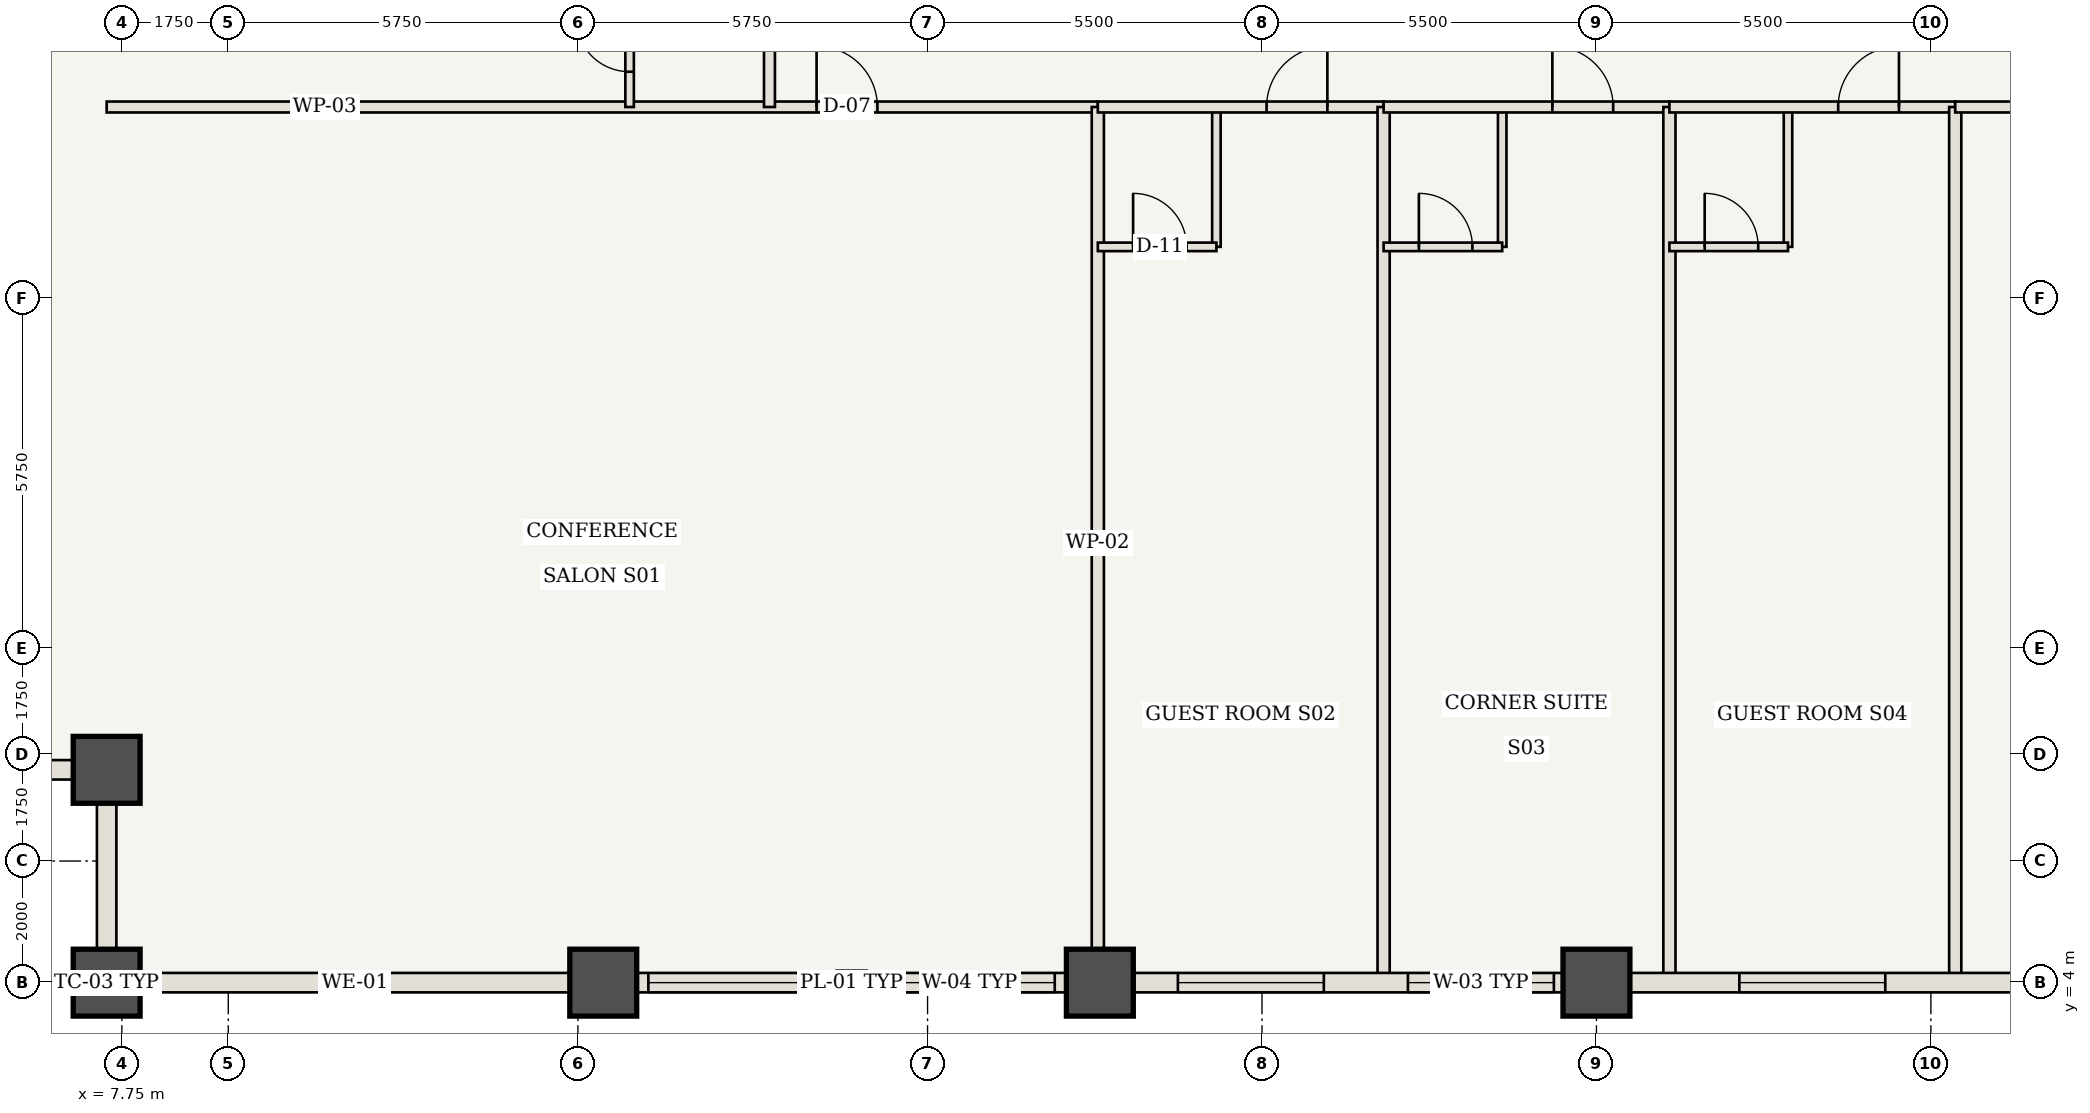
"""IFC4 building model, lengths in metres.
Left out: names, types, materials, properties, quantities, classifications, styles, units other than length and angle.
Written with IfcOpenShell. Run it as: python <this file> out.ifc"""

import sys

from ifc_helpers import new_model, si_unit, direction, frame, frame_2d, origin, origin_2d, place, context, subcontext, project, spatial, rectangle, extrude, element, fill, save


model = new_model("IFC4")
c1 = context("Model", 3, precision=1e-05, world=origin(), true_north=direction((0.0, 1.0)))
c2 = subcontext(c1, "Body", "Model", "MODEL_VIEW")
j1 = project(units=[si_unit("LENGTHUNIT", "METRE"), si_unit("PLANEANGLEUNIT", "RADIAN")], contexts=[c1])
p1 = place(None, origin())
s1 = spatial("IfcSite", under=j1, at=p1, CompositionType="ELEMENT")
p2 = place(p1, origin())
s2 = spatial("IfcBuilding", under=s1, at=p2, CompositionType="ELEMENT")
p3 = place(p2, frame((0.0, 0.0, 38.85)))
s3 = spatial("IfcBuildingStorey", under=s2, at=p3, CompositionType="ELEMENT", Elevation=38.85)
for number, where, z_axis, x_axis in (
    (1, (7.5, 4.0, 0.0), (0.0, 0.0, 1.0), (1.0, 0.0, 0.0)),
    (2, (7.5, 7.5, 0.0), (0.0, 0.0, 1.0), (1.0, 0.0, 0.0)),
    (3, (15.667, 4.0, 0.0), (0.0, 0.0, 1.0), (1.0, 0.0, 0.0)),
    (4, (23.833, 4.0, 0.0), (0.0, 0.0, 1.0), (1.0, 0.0, 0.0)),
    (5, (32.0, 4.0, 0.0), (0.0, 0.0, 1.0), (1.0, 0.0, 0.0)),
):
    element("IfcColumn", number, at=place(p3, frame(where, z_axis=z_axis, x_axis=x_axis)), inside=s3, PredefinedType="COLUMN", context=c2, shape_type="SweptSolid", body=[
        extrude(rectangle(XDim=1.1, YDim=1.1, at=origin_2d()), origin(), (0.0, 0.0, 1.0), 3.5),
    ])
p4 = place(p3, frame((7.5, 18.4, 0.0), z_axis=(0.0, 0.0, 1.0), x_axis=(1.0, 0.0, 0.0)))
e6 = element("IfcWall", 6, at=p4, inside=s3, PredefinedType="STANDARD", context=c2, shape_type="SweptSolid", body=[
    extrude(rectangle(XDim=16.3, YDim=0.18, at=frame_2d((8.15, 0.0))), origin(), (0.0, 0.0, 1.0), 3.08),
])
p5 = place(p4, frame((11.675, 0.0, 0.0)))
e7 = element("IfcOpeningElement", 7, at=p5, cuts=e6, PredefinedType="OPENING", context=c2, shape_type="SweptSolid", body=[
    extrude(rectangle(XDim=1.0, YDim=2.15, at=frame_2d((0.5, 1.075))), frame((0.0, 0.1, 0.0), z_axis=(0.0, -1.0, 0.0), x_axis=(1.0, 0.0, 0.0)), (0.0, 0.0, 1.0), 0.2),
])
p6 = place(p3, frame((23.8, 4.06, 0.0), z_axis=(0.0, 0.0, 1.0), x_axis=(0.0, 1.0, 0.0)))
e8 = element("IfcWall", 8, at=p6, inside=s3, PredefinedType="STANDARD", context=c2, shape_type="SweptSolid", body=[
    extrude(rectangle(XDim=14.34, YDim=0.2, at=frame_2d((7.17, 0.0))), origin(), (0.0, 0.0, 1.0), 3.08),
])
p7 = place(p3, frame((25.75, 16.1, 0.0), z_axis=(0.0, 0.0, 1.0), x_axis=(0.0, 1.0, 0.0)))
e9 = element("IfcWall", 9, at=p7, inside=s3, PredefinedType="STANDARD", context=c2, shape_type="SweptSolid", body=[
    extrude(rectangle(XDim=2.3, YDim=0.14, at=frame_2d((1.15, 0.0))), origin(), (0.0, 0.0, 1.0), 3.08),
])
p8 = place(p3, frame((23.8, 16.1, 0.0), z_axis=(0.0, 0.0, 1.0), x_axis=(1.0, 0.0, 0.0)))
e10 = element("IfcWall", 10, at=p8, inside=s3, PredefinedType="STANDARD", context=c2, shape_type="SweptSolid", body=[
    extrude(rectangle(XDim=1.95, YDim=0.14, at=frame_2d((0.975, 0.0))), origin(), (0.0, 0.0, 1.0), 3.08),
])
p9 = place(p8, frame((0.58, 0.0, 0.0)))
e11 = element("IfcOpeningElement", 11, at=p9, cuts=e10, PredefinedType="OPENING", context=c2, shape_type="SweptSolid", body=[
    extrude(rectangle(XDim=0.88, YDim=2.1, at=frame_2d((0.44, 1.05))), frame((0.0, 0.08, 0.0), z_axis=(0.0, -1.0, 0.0), x_axis=(1.0, 0.0, 0.0)), (0.0, 0.0, 1.0), 0.16),
])
p10 = place(p3, frame((23.8, 18.4, 0.0), z_axis=(0.0, 0.0, 1.0), x_axis=(1.0, 0.0, 0.0)))
e12 = element("IfcWall", 12, at=p10, inside=s3, PredefinedType="STANDARD", context=c2, shape_type="SweptSolid", body=[
    extrude(rectangle(XDim=4.7, YDim=0.18, at=frame_2d((2.35, 0.0))), origin(), (0.0, 0.0, 1.0), 3.08),
])
p11 = place(p10, frame((2.775, 0.0, 0.0)))
e13 = element("IfcOpeningElement", 13, at=p11, cuts=e12, PredefinedType="OPENING", context=c2, shape_type="SweptSolid", body=[
    extrude(rectangle(XDim=1.0, YDim=2.15, at=frame_2d((0.5, 1.075))), frame((0.0, 0.1, 0.0), z_axis=(0.0, -1.0, 0.0), x_axis=(1.0, 0.0, 0.0)), (0.0, 0.0, 1.0), 0.2),
])
p12 = place(p3, frame((28.5, 4.06, 0.0), z_axis=(0.0, 0.0, 1.0), x_axis=(0.0, 1.0, 0.0)))
e14 = element("IfcWall", 14, at=p12, inside=s3, PredefinedType="STANDARD", context=c2, shape_type="SweptSolid", body=[
    extrude(rectangle(XDim=14.34, YDim=0.2, at=frame_2d((7.17, 0.0))), origin(), (0.0, 0.0, 1.0), 3.08),
])
p13 = place(p3, frame((30.45, 16.1, 0.0), z_axis=(0.0, 0.0, 1.0), x_axis=(0.0, 1.0, 0.0)))
e15 = element("IfcWall", 15, at=p13, inside=s3, PredefinedType="STANDARD", context=c2, shape_type="SweptSolid", body=[
    extrude(rectangle(XDim=2.3, YDim=0.14, at=frame_2d((1.15, 0.0))), origin(), (0.0, 0.0, 1.0), 3.08),
])
p14 = place(p3, frame((28.5, 16.1, 0.0), z_axis=(0.0, 0.0, 1.0), x_axis=(1.0, 0.0, 0.0)))
e16 = element("IfcWall", 16, at=p14, inside=s3, PredefinedType="STANDARD", context=c2, shape_type="SweptSolid", body=[
    extrude(rectangle(XDim=1.95, YDim=0.14, at=frame_2d((0.975, 0.0))), origin(), (0.0, 0.0, 1.0), 3.08),
])
p15 = place(p14, frame((0.58, 0.0, 0.0)))
e17 = element("IfcOpeningElement", 17, at=p15, cuts=e16, PredefinedType="OPENING", context=c2, shape_type="SweptSolid", body=[
    extrude(rectangle(XDim=0.88, YDim=2.1, at=frame_2d((0.44, 1.05))), frame((0.0, 0.08, 0.0), z_axis=(0.0, -1.0, 0.0), x_axis=(1.0, 0.0, 0.0)), (0.0, 0.0, 1.0), 0.16),
])
p16 = place(p3, frame((28.5, 18.4, 0.0), z_axis=(0.0, 0.0, 1.0), x_axis=(1.0, 0.0, 0.0)))
e18 = element("IfcWall", 18, at=p16, inside=s3, PredefinedType="STANDARD", context=c2, shape_type="SweptSolid", body=[
    extrude(rectangle(XDim=4.7, YDim=0.18, at=frame_2d((2.35, 0.0))), origin(), (0.0, 0.0, 1.0), 3.08),
])
p17 = place(p16, frame((2.775, 0.0, 0.0)))
e19 = element("IfcOpeningElement", 19, at=p17, cuts=e18, PredefinedType="OPENING", context=c2, shape_type="SweptSolid", body=[
    extrude(rectangle(XDim=1.0, YDim=2.15, at=frame_2d((0.5, 1.075))), frame((0.0, 0.1, 0.0), z_axis=(0.0, -1.0, 0.0), x_axis=(1.0, 0.0, 0.0)), (0.0, 0.0, 1.0), 0.2),
])
p18 = place(p3, frame((33.2, 4.06, 0.0), z_axis=(0.0, 0.0, 1.0), x_axis=(0.0, 1.0, 0.0)))
e20 = element("IfcWall", 20, at=p18, inside=s3, PredefinedType="STANDARD", context=c2, shape_type="SweptSolid", body=[
    extrude(rectangle(XDim=14.34, YDim=0.2, at=frame_2d((7.17, 0.0))), origin(), (0.0, 0.0, 1.0), 3.08),
])
p19 = place(p3, frame((35.15, 16.1, 0.0), z_axis=(0.0, 0.0, 1.0), x_axis=(0.0, 1.0, 0.0)))
e21 = element("IfcWall", 21, at=p19, inside=s3, PredefinedType="STANDARD", context=c2, shape_type="SweptSolid", body=[
    extrude(rectangle(XDim=2.3, YDim=0.14, at=frame_2d((1.15, 0.0))), origin(), (0.0, 0.0, 1.0), 3.08),
])
p20 = place(p3, frame((33.2, 16.1, 0.0), z_axis=(0.0, 0.0, 1.0), x_axis=(1.0, 0.0, 0.0)))
e22 = element("IfcWall", 22, at=p20, inside=s3, PredefinedType="STANDARD", context=c2, shape_type="SweptSolid", body=[
    extrude(rectangle(XDim=1.95, YDim=0.14, at=frame_2d((0.975, 0.0))), origin(), (0.0, 0.0, 1.0), 3.08),
])
p21 = place(p20, frame((0.58, 0.0, 0.0)))
e23 = element("IfcOpeningElement", 23, at=p21, cuts=e22, PredefinedType="OPENING", context=c2, shape_type="SweptSolid", body=[
    extrude(rectangle(XDim=0.88, YDim=2.1, at=frame_2d((0.44, 1.05))), frame((0.0, 0.08, 0.0), z_axis=(0.0, -1.0, 0.0), x_axis=(1.0, 0.0, 0.0)), (0.0, 0.0, 1.0), 0.16),
])
p22 = place(p3, frame((33.2, 18.4, 0.0), z_axis=(0.0, 0.0, 1.0), x_axis=(1.0, 0.0, 0.0)))
e24 = element("IfcWall", 24, at=p22, inside=s3, PredefinedType="STANDARD", context=c2, shape_type="SweptSolid", body=[
    extrude(rectangle(XDim=4.7, YDim=0.18, at=frame_2d((2.35, 0.0))), origin(), (0.0, 0.0, 1.0), 3.08),
])
p23 = place(p22, frame((2.775, 0.0, 0.0)))
e25 = element("IfcOpeningElement", 25, at=p23, cuts=e24, PredefinedType="OPENING", context=c2, shape_type="SweptSolid", body=[
    extrude(rectangle(XDim=1.0, YDim=2.15, at=frame_2d((0.5, 1.075))), frame((0.0, 0.1, 0.0), z_axis=(0.0, -1.0, 0.0), x_axis=(1.0, 0.0, 0.0)), (0.0, 0.0, 1.0), 0.2),
])
p24 = place(p3, frame((37.9, 4.06, 0.0), z_axis=(0.0, 0.0, 1.0), x_axis=(0.0, 1.0, 0.0)))
e26 = element("IfcWall", 26, at=p24, inside=s3, PredefinedType="STANDARD", context=c2, shape_type="SweptSolid", body=[
    extrude(rectangle(XDim=14.34, YDim=0.2, at=frame_2d((7.17, 0.0))), origin(), (0.0, 0.0, 1.0), 3.08),
])
p25 = place(p3, frame((37.9, 18.4, 0.0), z_axis=(0.0, 0.0, 1.0), x_axis=(1.0, 0.0, 0.0)))
e27 = element("IfcWall", 27, at=p25, inside=s3, PredefinedType="STANDARD", context=c2, shape_type="SweptSolid", body=[
    extrude(rectangle(XDim=18.6, YDim=0.18, at=frame_2d((9.3, 0.0))), origin(), (0.0, 0.0, 1.0), 3.08),
])
p26 = place(p25, frame((4.775, 0.0, 0.0)))
e28 = element("IfcOpeningElement", 28, at=p26, cuts=e27, PredefinedType="OPENING", context=c2, shape_type="SweptSolid", body=[
    extrude(rectangle(XDim=1.0, YDim=2.15, at=frame_2d((0.5, 1.075))), frame((0.0, 0.1, 0.0), z_axis=(0.0, -1.0, 0.0), x_axis=(1.0, 0.0, 0.0)), (0.0, 0.0, 1.0), 0.2),
])
p27 = place(p3, frame((16.1, 18.4, 0.0), z_axis=(0.0, 0.0, 1.0), x_axis=(0.0, 1.0, 0.0)))
e29 = element("IfcWall", 29, at=p27, inside=s3, PredefinedType="STANDARD", context=c2, shape_type="SweptSolid", body=[
    extrude(rectangle(XDim=1.95, YDim=0.14, at=frame_2d((0.975, 0.0))), origin(), (0.0, 0.0, 1.0), 3.08),
])
p28 = place(p27, frame((0.58, 0.0, 0.0)))
e30 = element("IfcOpeningElement", 30, at=p28, cuts=e29, PredefinedType="OPENING", context=c2, shape_type="SweptSolid", body=[
    extrude(rectangle(XDim=0.88, YDim=2.1, at=frame_2d((0.44, 1.05))), frame((0.0, 0.08, 0.0), z_axis=(0.0, -1.0, 0.0), x_axis=(1.0, 0.0, 0.0)), (0.0, 0.0, 1.0), 0.16),
])
p29 = place(p3, frame((18.4, 18.4, 0.0), z_axis=(0.0, 0.0, 1.0), x_axis=(0.0, 1.0, 0.0)))
e31 = element("IfcWall", 31, at=p29, inside=s3, PredefinedType="STANDARD", context=c2, shape_type="SweptSolid", body=[
    extrude(rectangle(XDim=4.8, YDim=0.18, at=frame_2d((2.4, 0.0))), origin(), (0.0, 0.0, 1.0), 3.08),
])
p30 = place(p29, frame((2.825, 0.0, 0.0)))
e32 = element("IfcOpeningElement", 32, at=p30, cuts=e31, PredefinedType="OPENING", context=c2, shape_type="SweptSolid", body=[
    extrude(rectangle(XDim=1.0, YDim=2.15, at=frame_2d((0.5, 1.075))), frame((0.0, 0.1, 0.0), z_axis=(0.0, -1.0, 0.0), x_axis=(1.0, 0.0, 0.0)), (0.0, 0.0, 1.0), 0.2),
])
p31 = place(p3, frame((15.667, 4.0, 0.0), z_axis=(0.0, 0.0, 1.0), x_axis=(-1.0, 0.0, 0.0)))
e33 = element("IfcWall", 33, at=p31, inside=s3, PredefinedType="USERDEFINED", context=c2, shape_type="SweptSolid", body=[
    extrude(rectangle(XDim=8.167, YDim=0.32, at=frame_2d((4.083, 0.0))), origin(), (0.0, 0.0, 1.0), 2.28),
])
p32 = place(p3, frame((23.833, 4.0, 0.0), z_axis=(0.0, 0.0, 1.0), x_axis=(-1.0, 0.0, 0.0)))
e34 = element("IfcWall", 34, at=p32, inside=s3, PredefinedType="USERDEFINED", context=c2, shape_type="SweptSolid", body=[
    extrude(rectangle(XDim=8.167, YDim=0.32, at=frame_2d((4.083, 0.0))), origin(), (0.0, 0.0, 1.0), 2.28),
])
p33 = place(p32, frame((0.742, 0.0, 0.85)))
e35 = element("IfcOpeningElement", 35, at=p33, cuts=e34, PredefinedType="OPENING", context=c2, shape_type="SweptSolid", body=[
    extrude(rectangle(XDim=2.8, YDim=1.23, at=frame_2d((1.4, 0.615))), frame((0.0, 0.17, 0.0), z_axis=(0.0, -1.0, 0.0), x_axis=(1.0, 0.0, 0.0)), (0.0, 0.0, 1.0), 0.34),
])
p34 = place(p32, frame((4.625, 0.0, 0.85)))
e36 = element("IfcOpeningElement", 36, at=p34, cuts=e34, PredefinedType="OPENING", context=c2, shape_type="SweptSolid", body=[
    extrude(rectangle(XDim=2.8, YDim=1.23, at=frame_2d((1.4, 0.615))), frame((0.0, 0.17, 0.0), z_axis=(0.0, -1.0, 0.0), x_axis=(1.0, 0.0, 0.0)), (0.0, 0.0, 1.0), 0.34),
])
p35 = place(p3, frame((32.0, 4.0, 0.0), z_axis=(0.0, 0.0, 1.0), x_axis=(-1.0, 0.0, 0.0)))
e37 = element("IfcWall", 37, at=p35, inside=s3, PredefinedType="USERDEFINED", context=c2, shape_type="SweptSolid", body=[
    extrude(rectangle(XDim=8.167, YDim=0.32, at=frame_2d((4.083, 0.0))), origin(), (0.0, 0.0, 1.0), 2.28),
])
p36 = place(p35, frame((0.7, 0.0, 0.85)))
e38 = element("IfcOpeningElement", 38, at=p36, cuts=e37, PredefinedType="OPENING", context=c2, shape_type="SweptSolid", body=[
    extrude(rectangle(XDim=2.4, YDim=1.23, at=frame_2d((1.2, 0.615))), frame((0.0, 0.17, 0.0), z_axis=(0.0, -1.0, 0.0), x_axis=(1.0, 0.0, 0.0)), (0.0, 0.0, 1.0), 0.34),
])
p37 = place(p35, frame((4.483, 0.0, 0.85)))
e39 = element("IfcOpeningElement", 39, at=p37, cuts=e37, PredefinedType="OPENING", context=c2, shape_type="SweptSolid", body=[
    extrude(rectangle(XDim=2.4, YDim=1.23, at=frame_2d((1.2, 0.615))), frame((0.0, 0.17, 0.0), z_axis=(0.0, -1.0, 0.0), x_axis=(1.0, 0.0, 0.0)), (0.0, 0.0, 1.0), 0.34),
])
p38 = place(p3, frame((40.167, 4.0, 0.0), z_axis=(0.0, 0.0, 1.0), x_axis=(-1.0, 0.0, 0.0)))
e40 = element("IfcWall", 40, at=p38, inside=s3, PredefinedType="USERDEFINED", context=c2, shape_type="SweptSolid", body=[
    extrude(rectangle(XDim=8.167, YDim=0.32, at=frame_2d((4.083, 0.0))), origin(), (0.0, 0.0, 1.0), 2.28),
])
p39 = place(p38, frame((3.417, 0.0, 0.85)))
e41 = element("IfcOpeningElement", 41, at=p39, cuts=e40, PredefinedType="OPENING", context=c2, shape_type="SweptSolid", body=[
    extrude(rectangle(XDim=2.4, YDim=1.23, at=frame_2d((1.2, 0.615))), frame((0.0, 0.17, 0.0), z_axis=(0.0, -1.0, 0.0), x_axis=(1.0, 0.0, 0.0)), (0.0, 0.0, 1.0), 0.34),
])
for number, where, z_axis, x_axis in (
    (42, (7.5, 4.0, 0.0), (0.0, 0.0, 1.0), (0.0, 1.0, 0.0)),
    (43, (7.5, 7.5, 0.0), (0.0, 0.0, 1.0), (-1.0, 0.0, 0.0)),
):
    element("IfcWall", number, at=place(p3, frame(where, z_axis=z_axis, x_axis=x_axis)), inside=s3, PredefinedType="USERDEFINED", context=c2, shape_type="SweptSolid", body=[
        extrude(rectangle(XDim=3.5, YDim=0.32, at=frame_2d((1.75, 0.0))), origin(), (0.0, 0.0, 1.0), 2.28),
    ])
p40 = place(p5, origin())
e44 = element("IfcDoor", 44, at=p40, inside=s3, OperationType="SINGLE_SWING_LEFT", PredefinedType="DOOR", context=c2, shape_type="SweptSolid", body=[
    extrude(rectangle(XDim=1.0, YDim=2.15, at=frame_2d((0.5, 1.075))), frame((0.0, 0.025, 0.0), z_axis=(0.0, -1.0, 0.0), x_axis=(1.0, 0.0, 0.0)), (0.0, 0.0, 1.0), 0.05),
])
fill(e7, e44)
p41 = place(p9, origin())
e45 = element("IfcDoor", 45, at=p41, inside=s3, OperationType="SINGLE_SWING_LEFT", PredefinedType="DOOR", context=c2, shape_type="SweptSolid", body=[
    extrude(rectangle(XDim=0.88, YDim=2.1, at=frame_2d((0.44, 1.05))), frame((0.0, 0.025, 0.0), z_axis=(0.0, -1.0, 0.0), x_axis=(1.0, 0.0, 0.0)), (0.0, 0.0, 1.0), 0.05),
])
fill(e11, e45)
p42 = place(p11, origin())
e46 = element("IfcDoor", 46, at=p42, inside=s3, OperationType="SINGLE_SWING_RIGHT", PredefinedType="DOOR", context=c2, shape_type="SweptSolid", body=[
    extrude(rectangle(XDim=1.0, YDim=2.15, at=frame_2d((0.5, 1.075))), frame((0.0, 0.025, 0.0), z_axis=(0.0, -1.0, 0.0), x_axis=(1.0, 0.0, 0.0)), (0.0, 0.0, 1.0), 0.05),
])
fill(e13, e46)
p43 = place(p15, origin())
e47 = element("IfcDoor", 47, at=p43, inside=s3, OperationType="SINGLE_SWING_LEFT", PredefinedType="DOOR", context=c2, shape_type="SweptSolid", body=[
    extrude(rectangle(XDim=0.88, YDim=2.1, at=frame_2d((0.44, 1.05))), frame((0.0, 0.025, 0.0), z_axis=(0.0, -1.0, 0.0), x_axis=(1.0, 0.0, 0.0)), (0.0, 0.0, 1.0), 0.05),
])
fill(e17, e47)
p44 = place(p17, origin())
e48 = element("IfcDoor", 48, at=p44, inside=s3, OperationType="SINGLE_SWING_LEFT", PredefinedType="DOOR", context=c2, shape_type="SweptSolid", body=[
    extrude(rectangle(XDim=1.0, YDim=2.15, at=frame_2d((0.5, 1.075))), frame((0.0, 0.025, 0.0), z_axis=(0.0, -1.0, 0.0), x_axis=(1.0, 0.0, 0.0)), (0.0, 0.0, 1.0), 0.05),
])
fill(e19, e48)
p45 = place(p21, origin())
e49 = element("IfcDoor", 49, at=p45, inside=s3, OperationType="SINGLE_SWING_LEFT", PredefinedType="DOOR", context=c2, shape_type="SweptSolid", body=[
    extrude(rectangle(XDim=0.88, YDim=2.1, at=frame_2d((0.44, 1.05))), frame((0.0, 0.025, 0.0), z_axis=(0.0, -1.0, 0.0), x_axis=(1.0, 0.0, 0.0)), (0.0, 0.0, 1.0), 0.05),
])
fill(e23, e49)
p46 = place(p23, origin())
e50 = element("IfcDoor", 50, at=p46, inside=s3, OperationType="SINGLE_SWING_RIGHT", PredefinedType="DOOR", context=c2, shape_type="SweptSolid", body=[
    extrude(rectangle(XDim=1.0, YDim=2.15, at=frame_2d((0.5, 1.075))), frame((0.0, 0.025, 0.0), z_axis=(0.0, -1.0, 0.0), x_axis=(1.0, 0.0, 0.0)), (0.0, 0.0, 1.0), 0.05),
])
fill(e25, e50)
p47 = place(p28, origin())
e51 = element("IfcDoor", 51, at=p47, inside=s3, OperationType="SINGLE_SWING_RIGHT", PredefinedType="DOOR", context=c2, shape_type="SweptSolid", body=[
    extrude(rectangle(XDim=0.88, YDim=2.1, at=frame_2d((0.44, 1.05))), frame((0.0, 0.025, 0.0), z_axis=(0.0, -1.0, 0.0), x_axis=(1.0, 0.0, 0.0)), (0.0, 0.0, 1.0), 0.05),
])
fill(e30, e51)
p48 = place(p33, origin())
e52 = element("IfcWindow", 52, at=p48, inside=s3, PartitioningType="SINGLE_PANEL", PredefinedType="WINDOW", context=c2, shape_type="SweptSolid", body=[
    extrude(rectangle(XDim=2.8, YDim=1.23, at=frame_2d((1.4, 0.615))), frame((0.0, 0.03, 0.0), z_axis=(0.0, -1.0, 0.0), x_axis=(1.0, 0.0, 0.0)), (0.0, 0.0, 1.0), 0.06),
])
fill(e35, e52)
p49 = place(p34, origin())
e53 = element("IfcWindow", 53, at=p49, inside=s3, PartitioningType="SINGLE_PANEL", PredefinedType="WINDOW", context=c2, shape_type="SweptSolid", body=[
    extrude(rectangle(XDim=2.8, YDim=1.23, at=frame_2d((1.4, 0.615))), frame((0.0, 0.03, 0.0), z_axis=(0.0, -1.0, 0.0), x_axis=(1.0, 0.0, 0.0)), (0.0, 0.0, 1.0), 0.06),
])
fill(e36, e53)
p50 = place(p36, origin())
e54 = element("IfcWindow", 54, at=p50, inside=s3, PartitioningType="SINGLE_PANEL", PredefinedType="WINDOW", context=c2, shape_type="SweptSolid", body=[
    extrude(rectangle(XDim=2.4, YDim=1.23, at=frame_2d((1.2, 0.615))), frame((0.0, 0.03, 0.0), z_axis=(0.0, -1.0, 0.0), x_axis=(1.0, 0.0, 0.0)), (0.0, 0.0, 1.0), 0.06),
])
fill(e38, e54)
p51 = place(p37, origin())
e55 = element("IfcWindow", 55, at=p51, inside=s3, PartitioningType="SINGLE_PANEL", PredefinedType="WINDOW", context=c2, shape_type="SweptSolid", body=[
    extrude(rectangle(XDim=2.4, YDim=1.23, at=frame_2d((1.2, 0.615))), frame((0.0, 0.03, 0.0), z_axis=(0.0, -1.0, 0.0), x_axis=(1.0, 0.0, 0.0)), (0.0, 0.0, 1.0), 0.06),
])
fill(e39, e55)
p52 = place(p39, origin())
e56 = element("IfcWindow", 56, at=p52, inside=s3, PartitioningType="SINGLE_PANEL", PredefinedType="WINDOW", context=c2, shape_type="SweptSolid", body=[
    extrude(rectangle(XDim=2.4, YDim=1.23, at=frame_2d((1.2, 0.615))), frame((0.0, 0.03, 0.0), z_axis=(0.0, -1.0, 0.0), x_axis=(1.0, 0.0, 0.0)), (0.0, 0.0, 1.0), 0.06),
])
fill(e41, e56)
save(model, sys.argv[1])
